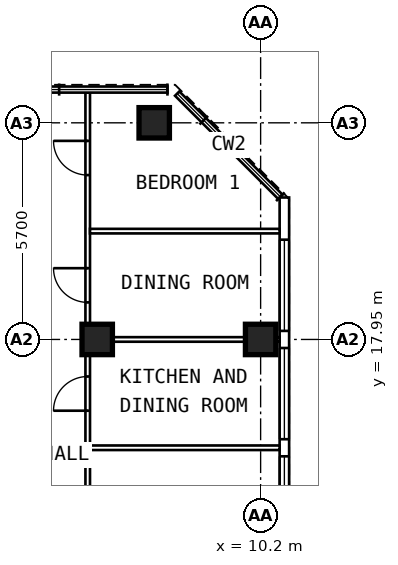
"""IFC4 building model, lengths in metres.
Left out: names, types, materials, properties, quantities, classifications, styles, units other than length and angle.
Written with IfcOpenShell. Run it as: python <this file> out.ifc"""

import sys

from ifc_helpers import new_model, si_unit, direction, frame, frame_2d, origin, origin_2d, place, context, subcontext, project, spatial, rectangle, extrude, element, fill, save


model = new_model("IFC4")
c1 = context("Model", 3, precision=1e-05, world=origin(), true_north=direction((0.0, 1.0)))
c2 = subcontext(c1, "Body", "Model", "MODEL_VIEW")
j1 = project(units=[si_unit("LENGTHUNIT", "METRE"), si_unit("PLANEANGLEUNIT", "RADIAN")], contexts=[c1])
p1 = place(None, origin())
s1 = spatial("IfcSite", under=j1, at=p1, CompositionType="ELEMENT")
p2 = place(p1, origin())
s2 = spatial("IfcBuilding", under=s1, at=p2, CompositionType="ELEMENT")
p3 = place(p2, frame((0.0, 0.0, 271.0)))
s3 = spatial("IfcBuildingStorey", under=s2, at=p3, CompositionType="ELEMENT", Elevation=271.0)
for number, where, z_axis, x_axis in (
    (1, (10.2, 17.95, 0.0), (0.0, 0.0, 1.0), (0.0, 1.0, 0.0)),
    (2, (7.4, 23.65, 0.0), (0.0, 0.0, 1.0), (0.0, 1.0, 0.0)),
    (3, (5.9, 17.95, 0.0), (0.0, 0.0, 1.0), (0.0, 1.0, 0.0)),
):
    element("IfcColumn", number, at=place(p3, frame(where, z_axis=z_axis, x_axis=x_axis)), inside=s3, PredefinedType="COLUMN", context=c2, shape_type="SweptSolid", body=[
        extrude(rectangle(XDim=0.8, YDim=0.8, at=origin_2d()), origin(), (0.0, 0.0, 1.0), 3.6),
    ])
p4 = place(p3, frame((10.825, 6.409, 0.0), z_axis=(0.0, 0.0, 1.0), x_axis=(0.0, 1.0, 0.0)))
e4 = element("IfcWall", 4, at=p4, inside=s3, PredefinedType="SOLIDWALL", context=c2, shape_type="SweptSolid", body=[
    extrude(rectangle(XDim=15.276, YDim=0.25, at=frame_2d((7.638, 0.0))), origin(), (0.0, 0.0, 1.0), 3.35),
])
p5 = place(p4, frame((0.366, 0.0, 0.6)))
e5 = element("IfcOpeningElement", 5, at=p5, cuts=e4, PredefinedType="OPENING", context=c2, shape_type="SweptSolid", body=[
    extrude(rectangle(XDim=2.4, YDim=2.0, at=frame_2d((1.2, 1.0))), frame((0.0, 0.137, 0.0), z_axis=(0.0, -1.0, 0.0), x_axis=(1.0, 0.0, 0.0)), (0.0, 0.0, 1.0), 0.274),
])
p6 = place(p4, frame((3.216, 0.0, 0.6)))
e6 = element("IfcOpeningElement", 6, at=p6, cuts=e4, PredefinedType="OPENING", context=c2, shape_type="SweptSolid", body=[
    extrude(rectangle(XDim=2.4, YDim=2.0, at=frame_2d((1.2, 1.0))), frame((0.0, 0.137, 0.0), z_axis=(0.0, -1.0, 0.0), x_axis=(1.0, 0.0, 0.0)), (0.0, 0.0, 1.0), 0.274),
])
p7 = place(p4, frame((6.066, 0.0, 0.6)))
e7 = element("IfcOpeningElement", 7, at=p7, cuts=e4, PredefinedType="OPENING", context=c2, shape_type="SweptSolid", body=[
    extrude(rectangle(XDim=2.4, YDim=2.0, at=frame_2d((1.2, 1.0))), frame((0.0, 0.137, 0.0), z_axis=(0.0, -1.0, 0.0), x_axis=(1.0, 0.0, 0.0)), (0.0, 0.0, 1.0), 0.274),
])
p8 = place(p4, frame((8.916, 0.0, 0.6)))
e8 = element("IfcOpeningElement", 8, at=p8, cuts=e4, PredefinedType="OPENING", context=c2, shape_type="SweptSolid", body=[
    extrude(rectangle(XDim=2.4, YDim=2.0, at=frame_2d((1.2, 1.0))), frame((0.0, 0.137, 0.0), z_axis=(0.0, -1.0, 0.0), x_axis=(1.0, 0.0, 0.0)), (0.0, 0.0, 1.0), 0.274),
])
p9 = place(p4, frame((11.766, 0.0, 0.6)))
e9 = element("IfcOpeningElement", 9, at=p9, cuts=e4, PredefinedType="OPENING", context=c2, shape_type="SweptSolid", body=[
    extrude(rectangle(XDim=2.4, YDim=2.0, at=frame_2d((1.2, 1.0))), frame((0.0, 0.137, 0.0), z_axis=(0.0, -1.0, 0.0), x_axis=(1.0, 0.0, 0.0)), (0.0, 0.0, 1.0), 0.274),
])
p10 = place(p3, frame((5.65, 9.6, 0.0), z_axis=(0.0, 0.0, 1.0), x_axis=(0.0, 1.0, 0.0)))
e10 = element("IfcWall", 10, at=p10, inside=s3, PredefinedType="PARTITIONING", context=c2, shape_type="SweptSolid", body=[
    extrude(rectangle(XDim=14.845, YDim=0.12, at=frame_2d((7.422, 0.0))), origin(), (0.0, 0.0, 1.0), 3.35),
])
p11 = place(p10, frame((3.2, 0.0, 0.0)))
e11 = element("IfcOpeningElement", 11, at=p11, cuts=e10, PredefinedType="OPENING", context=c2, shape_type="SweptSolid", body=[
    extrude(rectangle(XDim=0.9, YDim=2.1, at=frame_2d((0.45, 1.05))), frame((0.0, 0.072, 0.0), z_axis=(0.0, -1.0, 0.0), x_axis=(1.0, 0.0, 0.0)), (0.0, 0.0, 1.0), 0.144),
])
p12 = place(p10, frame((6.475, 0.0, 0.0)))
e12 = element("IfcOpeningElement", 12, at=p12, cuts=e10, PredefinedType="OPENING", context=c2, shape_type="SweptSolid", body=[
    extrude(rectangle(XDim=0.9, YDim=2.1, at=frame_2d((0.45, 1.05))), frame((0.0, 0.072, 0.0), z_axis=(0.0, -1.0, 0.0), x_axis=(1.0, 0.0, 0.0)), (0.0, 0.0, 1.0), 0.144),
])
p13 = place(p10, frame((9.325, 0.0, 0.0)))
e13 = element("IfcOpeningElement", 13, at=p13, cuts=e10, PredefinedType="OPENING", context=c2, shape_type="SweptSolid", body=[
    extrude(rectangle(XDim=0.9, YDim=2.1, at=frame_2d((0.45, 1.05))), frame((0.0, 0.072, 0.0), z_axis=(0.0, -1.0, 0.0), x_axis=(1.0, 0.0, 0.0)), (0.0, 0.0, 1.0), 0.144),
])
p14 = place(p10, frame((12.675, 0.0, 0.0)))
e14 = element("IfcOpeningElement", 14, at=p14, cuts=e10, PredefinedType="OPENING", context=c2, shape_type="SweptSolid", body=[
    extrude(rectangle(XDim=0.9, YDim=2.1, at=frame_2d((0.45, 1.05))), frame((0.0, 0.072, 0.0), z_axis=(0.0, -1.0, 0.0), x_axis=(1.0, 0.0, 0.0)), (0.0, 0.0, 1.0), 0.144),
])
p15 = place(p3, frame((5.71, 15.1, 0.0), z_axis=(0.0, 0.0, 1.0), x_axis=(1.0, 0.0, 0.0)))
e15 = element("IfcWall", 15, at=p15, inside=s3, PredefinedType="PARTITIONING", context=c2, shape_type="SweptSolid", body=[
    extrude(rectangle(XDim=4.99, YDim=0.12, at=frame_2d((2.495, 0.0))), origin(), (0.0, 0.0, 1.0), 3.35),
])
p16 = place(p3, frame((5.71, 17.95, 0.0), z_axis=(0.0, 0.0, 1.0), x_axis=(1.0, 0.0, 0.0)))
e16 = element("IfcWall", 16, at=p16, inside=s3, PredefinedType="PARTITIONING", context=c2, shape_type="SweptSolid", body=[
    extrude(rectangle(XDim=4.99, YDim=0.12, at=frame_2d((2.495, 0.0))), origin(), (0.0, 0.0, 1.0), 2.45),
])
p17 = place(p3, frame((5.71, 20.8, 0.0), z_axis=(0.0, 0.0, 1.0), x_axis=(1.0, 0.0, 0.0)))
e17 = element("IfcWall", 17, at=p17, inside=s3, PredefinedType="PARTITIONING", context=c2, shape_type="SweptSolid", body=[
    extrude(rectangle(XDim=4.99, YDim=0.12, at=frame_2d((2.495, 0.0))), origin(), (0.0, 0.0, 1.0), 3.35),
])
p18 = place(p7, origin())
e18 = element("IfcWindow", 18, at=p18, inside=s3, PartitioningType="SINGLE_PANEL", PredefinedType="WINDOW", context=c2, shape_type="SweptSolid", body=[
    extrude(rectangle(XDim=2.4, YDim=2.0, at=frame_2d((1.2, 1.0))), frame((0.0, 0.03, 0.0), z_axis=(0.0, -1.0, 0.0), x_axis=(1.0, 0.0, 0.0)), (0.0, 0.0, 1.0), 0.06),
])
fill(e7, e18)
p19 = place(p8, origin())
e19 = element("IfcWindow", 19, at=p19, inside=s3, PartitioningType="SINGLE_PANEL", PredefinedType="WINDOW", context=c2, shape_type="SweptSolid", body=[
    extrude(rectangle(XDim=2.4, YDim=2.0, at=frame_2d((1.2, 1.0))), frame((0.0, 0.03, 0.0), z_axis=(0.0, -1.0, 0.0), x_axis=(1.0, 0.0, 0.0)), (0.0, 0.0, 1.0), 0.06),
])
fill(e8, e19)
p20 = place(p9, origin())
e20 = element("IfcWindow", 20, at=p20, inside=s3, PartitioningType="SINGLE_PANEL", PredefinedType="WINDOW", context=c2, shape_type="SweptSolid", body=[
    extrude(rectangle(XDim=2.4, YDim=2.0, at=frame_2d((1.2, 1.0))), frame((0.0, 0.03, 0.0), z_axis=(0.0, -1.0, 0.0), x_axis=(1.0, 0.0, 0.0)), (0.0, 0.0, 1.0), 0.06),
])
fill(e9, e20)
p21 = place(p12, origin())
e21 = element("IfcDoor", 21, at=p21, inside=s3, OperationType="SINGLE_SWING_LEFT", PredefinedType="DOOR", context=c2, shape_type="SweptSolid", body=[
    extrude(rectangle(XDim=0.9, YDim=2.1, at=frame_2d((0.45, 1.05))), frame((0.0, 0.025, 0.0), z_axis=(0.0, -1.0, 0.0), x_axis=(1.0, 0.0, 0.0)), (0.0, 0.0, 1.0), 0.05),
])
fill(e12, e21)
p22 = place(p13, origin())
e22 = element("IfcDoor", 22, at=p22, inside=s3, OperationType="SINGLE_SWING_RIGHT", PredefinedType="DOOR", context=c2, shape_type="SweptSolid", body=[
    extrude(rectangle(XDim=0.9, YDim=2.1, at=frame_2d((0.45, 1.05))), frame((0.0, 0.025, 0.0), z_axis=(0.0, -1.0, 0.0), x_axis=(1.0, 0.0, 0.0)), (0.0, 0.0, 1.0), 0.05),
])
fill(e13, e22)
p23 = place(p14, origin())
e23 = element("IfcDoor", 23, at=p23, inside=s3, OperationType="SINGLE_SWING_RIGHT", PredefinedType="DOOR", context=c2, shape_type="SweptSolid", body=[
    extrude(rectangle(XDim=0.9, YDim=2.1, at=frame_2d((0.45, 1.05))), frame((0.0, 0.025, 0.0), z_axis=(0.0, -1.0, 0.0), x_axis=(1.0, 0.0, 0.0)), (0.0, 0.0, 1.0), 0.05),
])
fill(e14, e23)
save(model, sys.argv[1])
